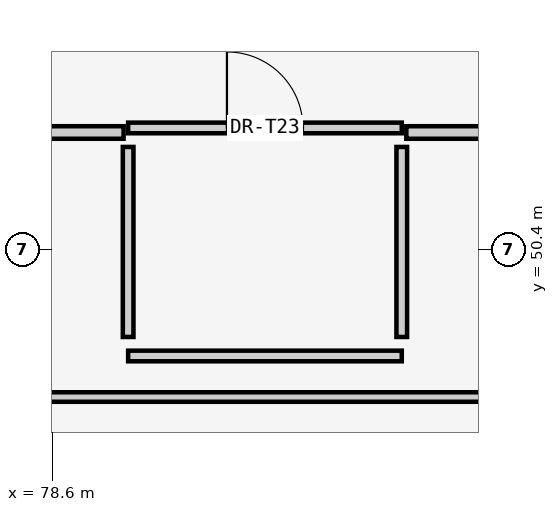
"""IFC4 building model, lengths in metres.
Left out: names, types, materials, properties, quantities, classifications, styles, units other than length and angle.
Written with IfcOpenShell. Run it as: python <this file> out.ifc"""

import sys

from ifc_helpers import new_model, si_unit, direction, frame, frame_2d, origin, place, context, subcontext, project, spatial, rectangle, extrude, element, fill, save


model = new_model("IFC4")
c1 = context("Model", 3, precision=1e-05, world=origin(), true_north=direction((0.0, 1.0)))
c2 = subcontext(c1, "Body", "Model", "MODEL_VIEW")
j1 = project(units=[si_unit("LENGTHUNIT", "METRE"), si_unit("PLANEANGLEUNIT", "RADIAN")], contexts=[c1])
p1 = place(None, origin())
s1 = spatial("IfcSite", under=j1, at=p1, CompositionType="ELEMENT")
p2 = place(p1, origin())
s2 = spatial("IfcBuilding", under=s1, at=p2, CompositionType="ELEMENT")
p3 = place(p2, frame((0.0, 0.0, -9.6)))
s3 = spatial("IfcBuildingStorey", under=s2, at=p3, CompositionType="ELEMENT", Elevation=-9.6)
p4 = place(p3, frame((79.6, 49.0, 0.0), z_axis=(0.0, 0.0, 1.0), x_axis=(1.0, 0.0, 0.0)))
e1 = element("IfcWall", 1, at=p4, inside=s3, PredefinedType="PARTITIONING", context=c2, shape_type="SweptSolid", body=[
    extrude(rectangle(XDim=3.6, YDim=0.14, at=frame_2d((1.8, 0.0))), origin(), (0.0, 0.0, 1.0), 4.32),
])
p5 = place(p3, frame((79.6, 52.0, 0.0), z_axis=(0.0, 0.0, 1.0), x_axis=(1.0, 0.0, 0.0)))
e2 = element("IfcWall", 2, at=p5, inside=s3, PredefinedType="PARTITIONING", context=c2, shape_type="SweptSolid", body=[
    extrude(rectangle(XDim=3.6, YDim=0.14, at=frame_2d((1.8, 0.0))), origin(), (0.0, 0.0, 1.0), 4.32),
])
p6 = place(p5, frame((1.3, 0.0, 0.0)))
e3 = element("IfcOpeningElement", 3, at=p6, cuts=e2, PredefinedType="OPENING", context=c2, shape_type="SweptSolid", body=[
    extrude(rectangle(XDim=1.0, YDim=2.15, at=frame_2d((0.5, 1.075))), frame((0.0, 0.08, 0.0), z_axis=(0.0, -1.0, 0.0), x_axis=(1.0, 0.0, 0.0)), (0.0, 0.0, 1.0), 0.16),
])
for number, where, z_axis, x_axis in (
    (4, (79.6, 49.25, 0.0), (0.0, 0.0, 1.0), (0.0, 1.0, 0.0)),
    (5, (83.2, 49.25, 0.0), (0.0, 0.0, 1.0), (0.0, 1.0, 0.0)),
):
    element("IfcWall", number, at=place(p3, frame(where, z_axis=z_axis, x_axis=x_axis)), inside=s3, PredefinedType="PARTITIONING", context=c2, shape_type="SweptSolid", body=[
        extrude(rectangle(XDim=2.5, YDim=0.14, at=frame_2d((1.25, 0.0))), origin(), (0.0, 0.0, 1.0), 4.32),
    ])
p7 = place(p3, frame((83.26, 51.94, 0.0), z_axis=(0.0, 0.0, 1.0), x_axis=(1.0, 0.0, 0.0)))
e6 = element("IfcWall", 6, at=p7, inside=s3, PredefinedType="PARTITIONING", context=c2, shape_type="SweptSolid", body=[
    extrude(rectangle(XDim=33.14, YDim=0.165, at=frame_2d((16.57, 0.0))), origin(), (0.0, 0.0, 1.0), 4.35),
])
p8 = place(p7, frame((15.97, 0.0, 0.0)))
e7 = element("IfcOpeningElement", 7, at=p8, cuts=e6, PredefinedType="OPENING", context=c2, shape_type="SweptSolid", body=[
    extrude(rectangle(XDim=1.2, YDim=2.2, at=frame_2d((0.6, 1.1))), frame((0.0, 0.093, 0.0), z_axis=(0.0, -1.0, 0.0), x_axis=(1.0, 0.0, 0.0)), (0.0, 0.0, 1.0), 0.185),
])
p9 = place(p3, frame((74.46, 51.94, 0.0), z_axis=(0.0, 0.0, 1.0), x_axis=(1.0, 0.0, 0.0)))
e8 = element("IfcWall", 8, at=p9, inside=s3, PredefinedType="PARTITIONING", context=c2, shape_type="SweptSolid", body=[
    extrude(rectangle(XDim=5.08, YDim=0.165, at=frame_2d((2.54, 0.0))), origin(), (0.0, 0.0, 1.0), 4.35),
])
p10 = place(p3, frame((74.46, 48.46, 0.0), z_axis=(0.0, 0.0, 1.0), x_axis=(1.0, 0.0, 0.0)))
e9 = element("IfcWall", 9, at=p10, inside=s3, PredefinedType="PARTITIONING", context=c2, shape_type="SweptSolid", body=[
    extrude(rectangle(XDim=60.03, YDim=0.125, at=frame_2d((30.015, 0.0))), origin(), (0.0, 0.0, 1.0), 4.35),
])
p11 = place(p6, origin())
e10 = element("IfcDoor", 10, at=p11, inside=s3, OperationType="SINGLE_SWING_LEFT", PredefinedType="DOOR", context=c2, shape_type="SweptSolid", body=[
    extrude(rectangle(XDim=1.0, YDim=2.15, at=frame_2d((0.5, 1.075))), frame((0.0, 0.025, 0.0), z_axis=(0.0, -1.0, 0.0), x_axis=(1.0, 0.0, 0.0)), (0.0, 0.0, 1.0), 0.05),
])
fill(e3, e10)
save(model, sys.argv[1])
